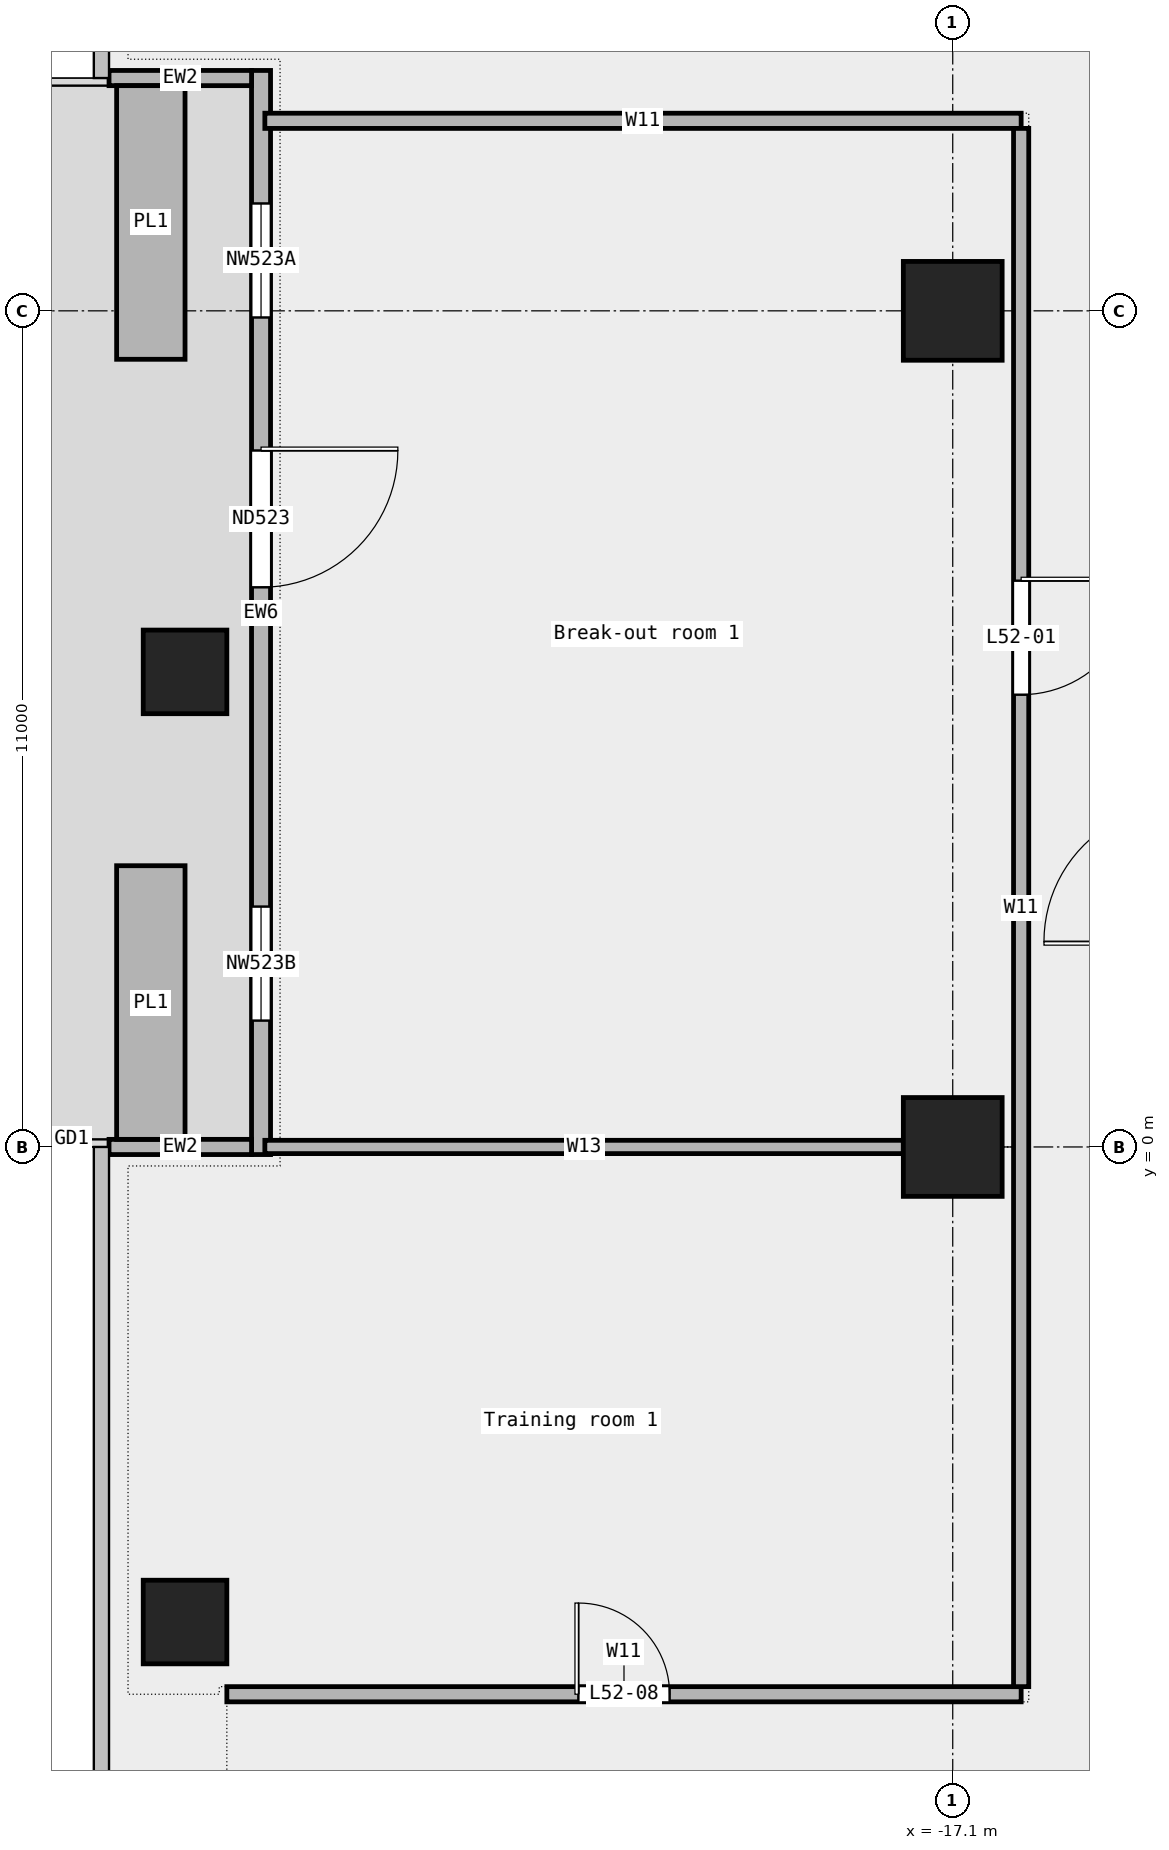
"""IFC4 building model, lengths in metres.
Left out: names, types, materials, properties, quantities, classifications, styles, units other than length and angle.
Written with IfcOpenShell. Run it as: python <this file> out.ifc"""

import sys

from ifc_helpers import new_model, si_unit, direction, frame, frame_2d, origin, origin_2d, place, context, subcontext, project, spatial, rectangle, extrude, element, fill, save


model = new_model("IFC4")
c1 = context("Model", 3, precision=1e-05, world=origin(), true_north=direction((0.0, 1.0)))
c2 = subcontext(c1, "Body", "Model", "MODEL_VIEW")
j1 = project(units=[si_unit("LENGTHUNIT", "METRE"), si_unit("PLANEANGLEUNIT", "RADIAN")], contexts=[c1])
p1 = place(None, origin())
s1 = spatial("IfcSite", under=j1, at=p1, CompositionType="ELEMENT")
p2 = place(p1, origin())
s2 = spatial("IfcBuilding", under=s1, at=p2, CompositionType="ELEMENT")
p3 = place(p2, frame((0.0, 0.0, 243.0)))
s3 = spatial("IfcBuildingStorey", under=s2, at=p3, CompositionType="ELEMENT", Elevation=243.0)
for number, where, z_axis, x_axis in (
    (1, (-27.2, 6.25, 0.0), (0.0, 0.0, 1.0), (1.0, 0.0, 0.0)),
    (2, (-27.2, -6.25, 0.0), (0.0, 0.0, 1.0), (1.0, 0.0, 0.0)),
):
    element("IfcColumn", number, at=place(p3, frame(where, z_axis=z_axis, x_axis=x_axis)), inside=s3, PredefinedType="COLUMN", context=c2, shape_type="SweptSolid", body=[
        extrude(rectangle(XDim=1.1, YDim=1.1, at=origin_2d()), origin(), (0.0, 0.0, 1.0), 3.6),
    ])
for number, where, z_axis, x_axis in (
    (3, (-17.1, 0.0, 0.0), (0.0, 0.0, 1.0), (1.0, 0.0, 0.0)),
    (4, (-17.1, 11.0, 0.0), (0.0, 0.0, 1.0), (1.0, 0.0, 0.0)),
):
    element("IfcColumn", number, at=place(p3, frame(where, z_axis=z_axis, x_axis=x_axis)), inside=s3, PredefinedType="COLUMN", context=c2, shape_type="SweptSolid", body=[
        extrude(rectangle(XDim=1.3, YDim=1.3, at=origin_2d()), origin(), (0.0, 0.0, 1.0), 3.6),
    ])
p4 = place(p3, frame((-26.2, 14.163, 0.0), z_axis=(0.0, 0.0, 1.0), x_axis=(0.0, -1.0, 0.0)))
e5 = element("IfcWall", 5, at=p4, inside=s3, PredefinedType="STANDARD", context=c2, shape_type="SweptSolid", body=[
    extrude(rectangle(XDim=14.263, YDim=0.25, at=frame_2d((7.131, 0.0))), origin(), (0.0, 0.0, 1.0), 3.6),
])
p5 = place(p4, frame((1.75, 0.0, 0.45)))
e6 = element("IfcOpeningElement", 6, at=p5, cuts=e5, PredefinedType="OPENING", context=c2, shape_type="SweptSolid", body=[
    extrude(rectangle(XDim=1.5, YDim=2.4, at=frame_2d((0.75, 1.2))), frame((0.0, 0.137, 0.0), z_axis=(0.0, -1.0, 0.0), x_axis=(1.0, 0.0, 0.0)), (0.0, 0.0, 1.0), 0.274),
])
p6 = place(p4, frame((5.0, 0.0, 0.0)))
e7 = element("IfcOpeningElement", 7, at=p6, cuts=e5, PredefinedType="OPENING", context=c2, shape_type="SweptSolid", body=[
    extrude(rectangle(XDim=1.8, YDim=2.4, at=frame_2d((0.9, 1.2))), frame((0.0, 0.137, 0.0), z_axis=(0.0, -1.0, 0.0), x_axis=(1.0, 0.0, 0.0)), (0.0, 0.0, 1.0), 0.274),
])
p7 = place(p4, frame((11.0, 0.0, 0.45)))
e8 = element("IfcOpeningElement", 8, at=p7, cuts=e5, PredefinedType="OPENING", context=c2, shape_type="SweptSolid", body=[
    extrude(rectangle(XDim=1.5, YDim=2.4, at=frame_2d((0.75, 1.2))), frame((0.0, 0.137, 0.0), z_axis=(0.0, -1.0, 0.0), x_axis=(1.0, 0.0, 0.0)), (0.0, 0.0, 1.0), 0.274),
])
for number, where, z_axis, x_axis in (
    (9, (-28.2, 14.062, 0.0), (0.0, 0.0, 1.0), (1.0, 0.0, 0.0)),
    (10, (-28.2, 0.0, 0.0), (0.0, 0.0, 1.0), (1.0, 0.0, 0.0)),
):
    element("IfcWall", number, at=place(p3, frame(where, z_axis=z_axis, x_axis=x_axis)), inside=s3, PredefinedType="STANDARD", context=c2, shape_type="SweptSolid", body=[
        extrude(rectangle(XDim=1.875, YDim=0.2, at=frame_2d((0.938, 0.0))), origin(), (0.0, 0.0, 1.0), 3.6),
    ])
for number, where, z_axis, x_axis in (
    (11, (-27.65, 13.962, 0.0), (0.0, 0.0, 1.0), (0.0, -1.0, 0.0)),
    (12, (-27.65, 3.7, 0.0), (0.0, 0.0, 1.0), (0.0, -1.0, 0.0)),
):
    element("IfcWall", number, at=place(p3, frame(where, z_axis=z_axis, x_axis=x_axis)), inside=s3, PredefinedType="STANDARD", context=c2, shape_type="SweptSolid", body=[
        extrude(rectangle(XDim=3.6, YDim=0.9, at=frame_2d((1.8, 0.0))), origin(), (0.0, 0.0, 1.0), 0.7),
    ])
p8 = place(p3, frame((-26.65, -7.2, 0.0), z_axis=(0.0, 0.0, 1.0), x_axis=(1.0, 0.0, 0.0)))
e13 = element("IfcWall", 13, at=p8, inside=s3, PredefinedType="PARTITIONING", context=c2, shape_type="SweptSolid", body=[
    extrude(rectangle(XDim=10.45, YDim=0.2, at=frame_2d((5.225, 0.0))), origin(), (0.0, 0.0, 1.0), 3.6),
])
p9 = place(p8, frame((4.625, 0.0, 0.0)))
e14 = element("IfcOpeningElement", 14, at=p9, cuts=e13, PredefinedType="OPENING", context=c2, shape_type="SweptSolid", body=[
    extrude(rectangle(XDim=1.2, YDim=2.1, at=frame_2d((0.6, 1.05))), frame((0.0, 0.112, 0.0), z_axis=(0.0, -1.0, 0.0), x_axis=(1.0, 0.0, 0.0)), (0.0, 0.0, 1.0), 0.224),
])
p10 = place(p3, frame((-26.15, 0.0, 0.0), z_axis=(0.0, 0.0, 1.0), x_axis=(1.0, 0.0, 0.0)))
e15 = element("IfcWall", 15, at=p10, inside=s3, PredefinedType="PARTITIONING", context=c2, shape_type="SweptSolid", body=[
    extrude(rectangle(XDim=8.4, YDim=0.175, at=frame_2d((4.2, 0.0))), origin(), (0.0, 0.0, 1.0), 3.6),
])
p11 = place(p3, frame((-26.15, 13.5, 0.0), z_axis=(0.0, 0.0, 1.0), x_axis=(1.0, 0.0, 0.0)))
e16 = element("IfcWall", 16, at=p11, inside=s3, PredefinedType="PARTITIONING", context=c2, shape_type="SweptSolid", body=[
    extrude(rectangle(XDim=9.95, YDim=0.2, at=frame_2d((4.975, 0.0))), origin(), (0.0, 0.0, 1.0), 3.6),
])
p12 = place(p3, frame((-16.2, -7.1, 0.0), z_axis=(0.0, 0.0, 1.0), x_axis=(0.0, 1.0, 0.0)))
e17 = element("IfcWall", 17, at=p12, inside=s3, PredefinedType="PARTITIONING", context=c2, shape_type="SweptSolid", body=[
    extrude(rectangle(XDim=20.5, YDim=0.2, at=frame_2d((10.25, 0.0))), origin(), (0.0, 0.0, 1.0), 3.6),
])
p13 = place(p12, frame((13.05, 0.0, 0.0)))
e18 = element("IfcOpeningElement", 18, at=p13, cuts=e17, PredefinedType="OPENING", context=c2, shape_type="SweptSolid", body=[
    extrude(rectangle(XDim=1.5, YDim=2.1, at=frame_2d((0.75, 1.05))), frame((0.0, 0.112, 0.0), z_axis=(0.0, -1.0, 0.0), x_axis=(1.0, 0.0, 0.0)), (0.0, 0.0, 1.0), 0.224),
])
p14 = place(p5, origin())
e19 = element("IfcWindow", 19, at=p14, inside=s3, PartitioningType="SINGLE_PANEL", PredefinedType="WINDOW", context=c2, shape_type="SweptSolid", body=[
    extrude(rectangle(XDim=1.5, YDim=2.4, at=frame_2d((0.75, 1.2))), frame((0.0, 0.03, 0.0), z_axis=(0.0, -1.0, 0.0), x_axis=(1.0, 0.0, 0.0)), (0.0, 0.0, 1.0), 0.06),
])
fill(e6, e19)
p15 = place(p6, origin())
e20 = element("IfcDoor", 20, at=p15, inside=s3, OperationType="DOUBLE_DOOR_SINGLE_SWING", PredefinedType="DOOR", context=c2, shape_type="SweptSolid", body=[
    extrude(rectangle(XDim=1.8, YDim=2.4, at=frame_2d((0.9, 1.2))), frame((0.0, 0.025, 0.0), z_axis=(0.0, -1.0, 0.0), x_axis=(1.0, 0.0, 0.0)), (0.0, 0.0, 1.0), 0.05),
])
fill(e7, e20)
p16 = place(p7, origin())
e21 = element("IfcWindow", 21, at=p16, inside=s3, PartitioningType="SINGLE_PANEL", PredefinedType="WINDOW", context=c2, shape_type="SweptSolid", body=[
    extrude(rectangle(XDim=1.5, YDim=2.4, at=frame_2d((0.75, 1.2))), frame((0.0, 0.03, 0.0), z_axis=(0.0, -1.0, 0.0), x_axis=(1.0, 0.0, 0.0)), (0.0, 0.0, 1.0), 0.06),
])
fill(e8, e21)
p17 = place(p13, origin())
e22 = element("IfcDoor", 22, at=p17, inside=s3, OperationType="DOUBLE_DOOR_SINGLE_SWING", PredefinedType="DOOR", context=c2, shape_type="SweptSolid", body=[
    extrude(rectangle(XDim=1.5, YDim=2.1, at=frame_2d((0.75, 1.05))), frame((0.0, 0.025, 0.0), z_axis=(0.0, -1.0, 0.0), x_axis=(1.0, 0.0, 0.0)), (0.0, 0.0, 1.0), 0.05),
])
fill(e18, e22)
p18 = place(p9, origin())
e23 = element("IfcDoor", 23, at=p18, inside=s3, OperationType="SINGLE_SWING_LEFT", PredefinedType="DOOR", context=c2, shape_type="SweptSolid", body=[
    extrude(rectangle(XDim=1.2, YDim=2.1, at=frame_2d((0.6, 1.05))), frame((0.0, 0.025, 0.0), z_axis=(0.0, -1.0, 0.0), x_axis=(1.0, 0.0, 0.0)), (0.0, 0.0, 1.0), 0.05),
])
fill(e14, e23)
save(model, sys.argv[1])
